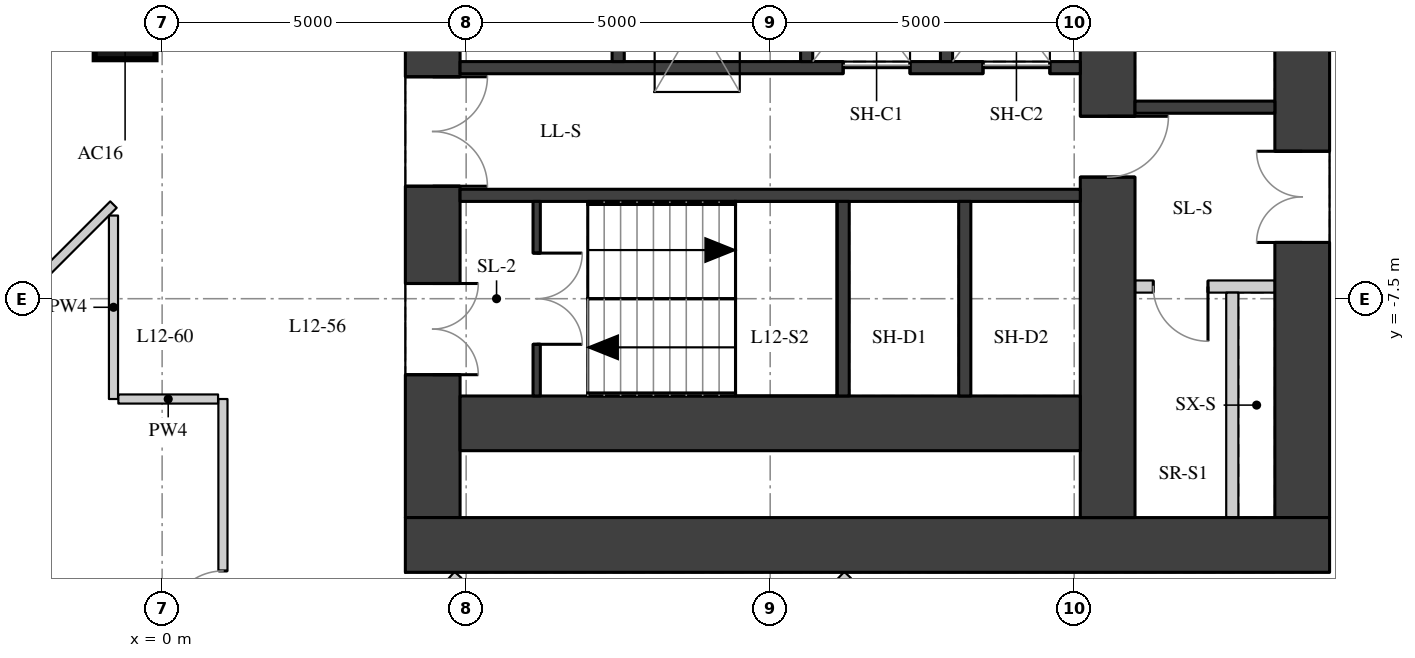
"""IFC4 building model, lengths in metres.
Left out: names, types, materials, properties, quantities, classifications, styles, units other than length and angle.
Written with IfcOpenShell. Run it as: python <this file> out.ifc"""

import sys

from ifc_helpers import new_model, si_unit, direction, frame, frame_2d, origin, origin_2d, place, context, subcontext, project, spatial, rectangle, extrude, element, fill, save


model = new_model("IFC4")
c1 = context("Model", 3, precision=1e-05, world=origin(), true_north=direction((0.0, 1.0)))
c2 = subcontext(c1, "Body", "Model", "MODEL_VIEW")
j1 = project(units=[si_unit("LENGTHUNIT", "METRE"), si_unit("PLANEANGLEUNIT", "RADIAN")], contexts=[c1])
p1 = place(None, origin())
s1 = spatial("IfcSite", under=j1, at=p1, CompositionType="ELEMENT")
p2 = place(p1, origin())
s2 = spatial("IfcBuilding", under=s1, at=p2, CompositionType="ELEMENT")
p3 = place(p2, frame((0.0, 0.0, 48.1)))
s3 = spatial("IfcBuildingStorey", under=s2, at=p3, CompositionType="ELEMENT", Elevation=48.1)
p4 = place(p3, frame((-0.609, -3.062, 0.0), z_axis=(0.0, 0.0, 1.0), x_axis=(1.0, 0.0, 0.0)))
e1 = element("IfcColumn", 1, at=p4, inside=s3, PredefinedType="COLUMN", context=c2, shape_type="SweptSolid", body=[
    extrude(rectangle(XDim=1.0, YDim=1.0, at=origin_2d()), origin(), (0.0, 0.0, 1.0), 3.3),
])
p5 = place(p3, frame((4.45, -11.1, 0.0), z_axis=(0.0, 0.0, 1.0), x_axis=(0.0, 1.0, 0.0)))
e2 = element("IfcWall", 2, at=p5, inside=s3, PredefinedType="SHEAR", context=c2, shape_type="SweptSolid", body=[
    extrude(rectangle(XDim=22.2, YDim=0.9, at=frame_2d((11.1, 0.0))), origin(), (0.0, 0.0, 1.0), 3.02),
])
p6 = place(p5, frame((2.35, 0.0, 0.0)))
e3 = element("IfcOpeningElement", 3, at=p6, cuts=e2, PredefinedType="OPENING", context=c2, shape_type="SweptSolid", body=[
    extrude(rectangle(XDim=1.5, YDim=2.1, at=frame_2d((0.75, 1.05))), frame((0.0, 0.46, 0.0), z_axis=(0.0, -1.0, 0.0), x_axis=(1.0, 0.0, 0.0)), (0.0, 0.0, 1.0), 0.92),
])
p7 = place(p5, frame((5.45, 0.0, 0.0)))
e4 = element("IfcOpeningElement", 4, at=p7, cuts=e2, PredefinedType="OPENING", context=c2, shape_type="SweptSolid", body=[
    extrude(rectangle(XDim=1.8, YDim=2.1, at=frame_2d((0.9, 1.05))), frame((0.0, 0.46, 0.0), z_axis=(0.0, -1.0, 0.0), x_axis=(1.0, 0.0, 0.0)), (0.0, 0.0, 1.0), 0.92),
])
p8 = place(p5, frame((7.95, 0.0, 0.0)))
e5 = element("IfcOpeningElement", 5, at=p8, cuts=e2, PredefinedType="OPENING", context=c2, shape_type="SweptSolid", body=[
    extrude(rectangle(XDim=1.1, YDim=2.1, at=frame_2d((0.55, 1.05))), frame((0.0, 0.46, 0.0), z_axis=(0.0, -1.0, 0.0), x_axis=(1.0, 0.0, 0.0)), (0.0, 0.0, 1.0), 0.92),
])
p9 = place(p5, frame((10.6, 0.0, 0.0)))
e6 = element("IfcOpeningElement", 6, at=p9, cuts=e2, PredefinedType="OPENING", context=c2, shape_type="SweptSolid", body=[
    extrude(rectangle(XDim=1.0, YDim=2.1, at=frame_2d((0.5, 1.05))), frame((0.0, 0.46, 0.0), z_axis=(0.0, -1.0, 0.0), x_axis=(1.0, 0.0, 0.0)), (0.0, 0.0, 1.0), 0.92),
])
p10 = place(p5, frame((13.15, 0.0, 0.0)))
e7 = element("IfcOpeningElement", 7, at=p10, cuts=e2, PredefinedType="OPENING", context=c2, shape_type="SweptSolid", body=[
    extrude(rectangle(XDim=1.1, YDim=2.1, at=frame_2d((0.55, 1.05))), frame((0.0, 0.46, 0.0), z_axis=(0.0, -1.0, 0.0), x_axis=(1.0, 0.0, 0.0)), (0.0, 0.0, 1.0), 0.92),
])
p11 = place(p5, frame((14.95, 0.0, 0.0)))
e8 = element("IfcOpeningElement", 8, at=p11, cuts=e2, PredefinedType="OPENING", context=c2, shape_type="SweptSolid", body=[
    extrude(rectangle(XDim=1.8, YDim=2.1, at=frame_2d((0.9, 1.05))), frame((0.0, 0.46, 0.0), z_axis=(0.0, -1.0, 0.0), x_axis=(1.0, 0.0, 0.0)), (0.0, 0.0, 1.0), 0.92),
])
p12 = place(p5, frame((18.35, 0.0, 0.0)))
e9 = element("IfcOpeningElement", 9, at=p12, cuts=e2, PredefinedType="OPENING", context=c2, shape_type="SweptSolid", body=[
    extrude(rectangle(XDim=1.5, YDim=2.1, at=frame_2d((0.75, 1.05))), frame((0.0, 0.46, 0.0), z_axis=(0.0, -1.0, 0.0), x_axis=(1.0, 0.0, 0.0)), (0.0, 0.0, 1.0), 0.92),
])
p13 = place(p3, frame((18.75, -11.1, 0.0), z_axis=(0.0, 0.0, 1.0), x_axis=(0.0, 1.0, 0.0)))
e10 = element("IfcWall", 10, at=p13, inside=s3, PredefinedType="SHEAR", context=c2, shape_type="SweptSolid", body=[
    extrude(rectangle(XDim=22.2, YDim=0.9, at=frame_2d((11.1, 0.0))), origin(), (0.0, 0.0, 1.0), 3.02),
])
p14 = place(p13, frame((15.925, 0.0, 0.0)))
e11 = element("IfcOpeningElement", 11, at=p14, cuts=e10, PredefinedType="OPENING", context=c2, shape_type="SweptSolid", body=[
    extrude(rectangle(XDim=1.5, YDim=2.1, at=frame_2d((0.75, 1.05))), frame((0.0, 0.46, 0.0), z_axis=(0.0, -1.0, 0.0), x_axis=(1.0, 0.0, 0.0)), (0.0, 0.0, 1.0), 0.92),
])
p15 = place(p13, frame((4.525, 0.0, 0.0)))
e12 = element("IfcOpeningElement", 12, at=p15, cuts=e10, PredefinedType="OPENING", context=c2, shape_type="SweptSolid", body=[
    extrude(rectangle(XDim=1.5, YDim=2.1, at=frame_2d((0.75, 1.05))), frame((0.0, 0.46, 0.0), z_axis=(0.0, -1.0, 0.0), x_axis=(1.0, 0.0, 0.0)), (0.0, 0.0, 1.0), 0.92),
])
p16 = place(p3, frame((4.0, -11.55, 0.0), z_axis=(0.0, 0.0, 1.0), x_axis=(1.0, 0.0, 0.0)))
e13 = element("IfcWall", 13, at=p16, inside=s3, PredefinedType="SHEAR", context=c2, shape_type="SweptSolid", body=[
    extrude(rectangle(XDim=15.2, YDim=0.9, at=frame_2d((7.6, 0.0))), origin(), (0.0, 0.0, 1.0), 3.02),
])
p17 = place(p3, frame((15.55, -11.1, 0.0), z_axis=(0.0, 0.0, 1.0), x_axis=(0.0, 1.0, 0.0)))
e14 = element("IfcWall", 14, at=p17, inside=s3, PredefinedType="SHEAR", context=c2, shape_type="SweptSolid", body=[
    extrude(rectangle(XDim=22.2, YDim=0.9, at=frame_2d((11.1, 0.0))), origin(), (0.0, 0.0, 1.0), 3.02),
])
p18 = place(p17, frame((15.6, 0.0, 0.0)))
e15 = element("IfcOpeningElement", 15, at=p18, cuts=e14, PredefinedType="OPENING", context=c2, shape_type="SweptSolid", body=[
    extrude(rectangle(XDim=1.0, YDim=2.1, at=frame_2d((0.5, 1.05))), frame((0.0, 0.46, 0.0), z_axis=(0.0, -1.0, 0.0), x_axis=(1.0, 0.0, 0.0)), (0.0, 0.0, 1.0), 0.92),
])
p19 = place(p17, frame((5.6, 0.0, 0.0)))
e16 = element("IfcOpeningElement", 16, at=p19, cuts=e14, PredefinedType="OPENING", context=c2, shape_type="SweptSolid", body=[
    extrude(rectangle(XDim=1.0, YDim=2.1, at=frame_2d((0.5, 1.05))), frame((0.0, 0.46, 0.0), z_axis=(0.0, -1.0, 0.0), x_axis=(1.0, 0.0, 0.0)), (0.0, 0.0, 1.0), 0.92),
])
p20 = place(p3, frame((4.9, -9.55, 0.0), z_axis=(0.0, 0.0, 1.0), x_axis=(1.0, 0.0, 0.0)))
e17 = element("IfcWall", 17, at=p20, inside=s3, PredefinedType="SHEAR", context=c2, shape_type="SweptSolid", body=[
    extrude(rectangle(XDim=10.2, YDim=0.9, at=frame_2d((5.1, 0.0))), origin(), (0.0, 0.0, 1.0), 3.02),
])
p21 = place(p3, frame((4.9, -3.7, 0.0), z_axis=(0.0, 0.0, 1.0), x_axis=(1.0, 0.0, 0.0)))
e18 = element("IfcWall", 18, at=p21, inside=s3, PredefinedType="SHEAR", context=c2, shape_type="SweptSolid", body=[
    extrude(rectangle(XDim=10.2, YDim=0.2, at=frame_2d((5.1, 0.0))), origin(), (0.0, 0.0, 1.0), 3.02),
])
p22 = place(p21, frame((6.3, 0.0, 0.0)))
e19 = element("IfcOpeningElement", 19, at=p22, cuts=e18, PredefinedType="OPENING", context=c2, shape_type="SweptSolid", body=[
    extrude(rectangle(XDim=1.1, YDim=2.1, at=frame_2d((0.55, 1.05))), frame((0.0, 0.11, 0.0), z_axis=(0.0, -1.0, 0.0), x_axis=(1.0, 0.0, 0.0)), (0.0, 0.0, 1.0), 0.22),
])
p23 = place(p21, frame((8.6, 0.0, 0.0)))
e20 = element("IfcOpeningElement", 20, at=p23, cuts=e18, PredefinedType="OPENING", context=c2, shape_type="SweptSolid", body=[
    extrude(rectangle(XDim=1.1, YDim=2.1, at=frame_2d((0.55, 1.05))), frame((0.0, 0.11, 0.0), z_axis=(0.0, -1.0, 0.0), x_axis=(1.0, 0.0, 0.0)), (0.0, 0.0, 1.0), 0.22),
])
p24 = place(p3, frame((4.9, -5.8, 0.0), z_axis=(0.0, 0.0, 1.0), x_axis=(1.0, 0.0, 0.0)))
e21 = element("IfcWall", 21, at=p24, inside=s3, PredefinedType="SHEAR", context=c2, shape_type="SweptSolid", body=[
    extrude(rectangle(XDim=10.2, YDim=0.2, at=frame_2d((5.1, 0.0))), origin(), (0.0, 0.0, 1.0), 3.02),
])
for number, where, z_axis, x_axis in (
    (22, (11.2, -9.1, 0.0), (0.0, 0.0, 1.0), (0.0, 1.0, 0.0)),
    (23, (13.2, -9.1, 0.0), (0.0, 0.0, 1.0), (0.0, 1.0, 0.0)),
):
    element("IfcWall", number, at=place(p3, frame(where, z_axis=z_axis, x_axis=x_axis)), inside=s3, PredefinedType="SHEAR", context=c2, shape_type="SweptSolid", body=[
        extrude(rectangle(XDim=3.2, YDim=0.2, at=frame_2d((1.6, 0.0))), origin(), (0.0, 0.0, 1.0), 3.02),
    ])
p25 = place(p3, frame((7.5, -3.6, 0.0), z_axis=(0.0, 0.0, 1.0), x_axis=(0.0, 1.0, 0.0)))
e24 = element("IfcWall", 24, at=p25, inside=s3, PredefinedType="SHEAR", context=c2, shape_type="SweptSolid", body=[
    extrude(rectangle(XDim=2.5, YDim=0.2, at=frame_2d((1.25, 0.0))), origin(), (0.0, 0.0, 1.0), 3.02),
])
p26 = place(p25, frame((0.7, 0.0, 0.0)))
e25 = element("IfcOpeningElement", 25, at=p26, cuts=e24, PredefinedType="OPENING", context=c2, shape_type="SweptSolid", body=[
    extrude(rectangle(XDim=1.1, YDim=2.1, at=frame_2d((0.55, 1.05))), frame((0.0, 0.11, 0.0), z_axis=(0.0, -1.0, 0.0), x_axis=(1.0, 0.0, 0.0)), (0.0, 0.0, 1.0), 0.22),
])
for number, where, z_axis, x_axis in (
    (26, (10.6, -3.6, 0.0), (0.0, 0.0, 1.0), (0.0, 1.0, 0.0)),
    (27, (12.9, -3.6, 0.0), (0.0, 0.0, 1.0), (0.0, 1.0, 0.0)),
):
    element("IfcWall", number, at=place(p3, frame(where, z_axis=z_axis, x_axis=x_axis)), inside=s3, PredefinedType="SHEAR", context=c2, shape_type="SweptSolid", body=[
        extrude(rectangle(XDim=2.5, YDim=0.2, at=frame_2d((1.25, 0.0))), origin(), (0.0, 0.0, 1.0), 3.02),
    ])
p27 = place(p3, frame((6.16, -9.1, 0.0), z_axis=(0.0, 0.0, 1.0), x_axis=(0.0, 1.0, 0.0)))
e28 = element("IfcWall", 28, at=p27, inside=s3, PredefinedType="SHEAR", context=c2, shape_type="SweptSolid", body=[
    extrude(rectangle(XDim=3.2, YDim=0.12, at=frame_2d((1.6, 0.0))), origin(), (0.0, 0.0, 1.0), 3.02),
])
p28 = place(p27, frame((0.85, 0.0, 0.0)))
e29 = element("IfcOpeningElement", 29, at=p28, cuts=e28, PredefinedType="OPENING", context=c2, shape_type="SweptSolid", body=[
    extrude(rectangle(XDim=1.5, YDim=2.1, at=frame_2d((0.75, 1.05))), frame((0.0, 0.07, 0.0), z_axis=(0.0, -1.0, 0.0), x_axis=(1.0, 0.0, 0.0)), (0.0, 0.0, 1.0), 0.14),
])
p29 = place(p3, frame((16.0, -4.35, 0.0), z_axis=(0.0, 0.0, 1.0), x_axis=(1.0, 0.0, 0.0)))
e30 = element("IfcWall", 30, at=p29, inside=s3, PredefinedType="SHEAR", context=c2, shape_type="SweptSolid", body=[
    extrude(rectangle(XDim=2.3, YDim=0.2, at=frame_2d((1.15, 0.0))), origin(), (0.0, 0.0, 1.0), 3.02),
])
p30 = place(p3, frame((16.0, -7.3, 0.0), z_axis=(0.0, 0.0, 1.0), x_axis=(1.0, 0.0, 0.0)))
e31 = element("IfcWall", 31, at=p30, inside=s3, PredefinedType="PARTITIONING", context=c2, shape_type="SweptSolid", body=[
    extrude(rectangle(XDim=2.3, YDim=0.2, at=frame_2d((1.15, 0.0))), origin(), (0.0, 0.0, 1.0), 3.02),
])
p31 = place(p30, frame((0.3, 0.0, 0.0)))
e32 = element("IfcOpeningElement", 32, at=p31, cuts=e31, PredefinedType="OPENING", context=c2, shape_type="SweptSolid", body=[
    extrude(rectangle(XDim=0.9, YDim=2.1, at=frame_2d((0.45, 1.05))), frame((0.0, 0.11, 0.0), z_axis=(0.0, -1.0, 0.0), x_axis=(1.0, 0.0, 0.0)), (0.0, 0.0, 1.0), 0.22),
])
p32 = place(p3, frame((17.6, -11.1, 0.0), z_axis=(0.0, 0.0, 1.0), x_axis=(0.0, 1.0, 0.0)))
e33 = element("IfcWall", 33, at=p32, inside=s3, PredefinedType="PARTITIONING", context=c2, shape_type="SweptSolid", body=[
    extrude(rectangle(XDim=3.7, YDim=0.2, at=frame_2d((1.85, 0.0))), origin(), (0.0, 0.0, 1.0), 3.02),
])
p33 = place(p3, frame((1.0, -9.15, 0.0), z_axis=(0.0, 0.0, 1.0), x_axis=(0.0, -1.0, 0.0)))
e34 = element("IfcWall", 34, at=p33, inside=s3, PredefinedType="PARTITIONING", context=c2, shape_type="SweptSolid", body=[
    extrude(rectangle(XDim=6.556, YDim=0.15, at=frame_2d((3.278, 0.0))), origin(), (0.0, 0.0, 1.0), 2.47),
])
p34 = place(p33, frame((2.828, 0.0, 0.0)))
e35 = element("IfcOpeningElement", 35, at=p34, cuts=e34, PredefinedType="OPENING", context=c2, shape_type="SweptSolid", body=[
    extrude(rectangle(XDim=0.9, YDim=2.1, at=frame_2d((0.45, 1.05))), frame((0.0, 0.085, 0.0), z_axis=(0.0, -1.0, 0.0), x_axis=(1.0, 0.0, 0.0)), (0.0, 0.0, 1.0), 0.17),
])
p35 = place(p3, frame((-3.158, -8.31, 0.0), z_axis=(0.0, 0.0, 1.0), x_axis=(0.707106781187, 0.707106781187, 0.0)))
e36 = element("IfcWall", 36, at=p35, inside=s3, PredefinedType="PARTITIONING", context=c2, shape_type="SweptSolid", body=[
    extrude(rectangle(XDim=3.334, YDim=0.15, at=frame_2d((1.667, 0.0))), origin(), (0.0, 0.0, 1.0), 3.02),
])
p36 = place(p3, frame((-0.8, -6.132, 0.0), z_axis=(0.0, 0.0, 1.0), x_axis=(0.0, -1.0, 0.0)))
e37 = element("IfcWall", 37, at=p36, inside=s3, PredefinedType="PARTITIONING", context=c2, shape_type="SweptSolid", body=[
    extrude(rectangle(XDim=3.018, YDim=0.15, at=frame_2d((1.509, 0.0))), origin(), (0.0, 0.0, 1.0), 3.02),
])
p37 = place(p3, frame((-0.72, -9.15, 0.0), z_axis=(0.0, 0.0, 1.0), x_axis=(1.0, 0.0, 0.0)))
e38 = element("IfcWall", 38, at=p37, inside=s3, PredefinedType="PARTITIONING", context=c2, shape_type="SweptSolid", body=[
    extrude(rectangle(XDim=1.64, YDim=0.15, at=frame_2d((0.82, 0.0))), origin(), (0.0, 0.0, 1.0), 3.02),
])
p38 = place(p3, frame((11.273, -12.043, 0.0), z_axis=(0.0, 0.0, 1.0), x_axis=(-0.687435283659, -0.7262456408, 0.0)))
e39 = element("IfcWall", 39, at=p38, inside=s3, PredefinedType="PARTITIONING", context=c2, shape_type="SweptSolid", body=[
    extrude(rectangle(XDim=2.233, YDim=0.15, at=frame_2d((1.117, 0.0))), origin(), (0.0, 0.0, 1.0), 3.02),
])
p39 = place(p3, frame((4.353, -12.623, 0.0), z_axis=(0.0, 0.0, 1.0), x_axis=(0.660265480509, 0.751032286422, 0.0)))
e40 = element("IfcWall", 40, at=p39, inside=s3, PredefinedType="PARTITIONING", context=c2, shape_type="SweptSolid", body=[
    extrude(rectangle(XDim=0.775, YDim=0.15, at=frame_2d((0.387, 0.0))), origin(), (0.0, 0.0, 1.0), 2.57),
])
p40 = place(p6, origin())
e41 = element("IfcDoor", 41, at=p40, inside=s3, OperationType="DOUBLE_DOOR_SINGLE_SWING", PredefinedType="DOOR", context=c2, shape_type="SweptSolid", body=[
    extrude(rectangle(XDim=1.5, YDim=2.1, at=frame_2d((0.75, 1.05))), frame((0.0, 0.025, 0.0), z_axis=(0.0, -1.0, 0.0), x_axis=(1.0, 0.0, 0.0)), (0.0, 0.0, 1.0), 0.05),
])
fill(e3, e41)
p41 = place(p7, origin())
e42 = element("IfcDoor", 42, at=p41, inside=s3, OperationType="DOUBLE_DOOR_SINGLE_SWING", PredefinedType="DOOR", context=c2, shape_type="SweptSolid", body=[
    extrude(rectangle(XDim=1.8, YDim=2.1, at=frame_2d((0.9, 1.05))), frame((0.0, 0.025, 0.0), z_axis=(0.0, -1.0, 0.0), x_axis=(1.0, 0.0, 0.0)), (0.0, 0.0, 1.0), 0.05),
])
fill(e4, e42)
p42 = place(p15, origin())
e43 = element("IfcDoor", 43, at=p42, inside=s3, OperationType="DOUBLE_DOOR_SINGLE_SWING", PredefinedType="DOOR", context=c2, shape_type="SweptSolid", body=[
    extrude(rectangle(XDim=1.5, YDim=2.1, at=frame_2d((0.75, 1.05))), frame((0.0, 0.025, 0.0), z_axis=(0.0, -1.0, 0.0), x_axis=(1.0, 0.0, 0.0)), (0.0, 0.0, 1.0), 0.05),
])
fill(e12, e43)
p43 = place(p28, origin())
e44 = element("IfcDoor", 44, at=p43, inside=s3, OperationType="DOUBLE_DOOR_SINGLE_SWING", PredefinedType="DOOR", context=c2, shape_type="SweptSolid", body=[
    extrude(rectangle(XDim=1.5, YDim=2.1, at=frame_2d((0.75, 1.05))), frame((0.0, 0.025, 0.0), z_axis=(0.0, -1.0, 0.0), x_axis=(1.0, 0.0, 0.0)), (0.0, 0.0, 1.0), 0.05),
])
fill(e29, e44)
p44 = place(p22, origin())
e45 = element("IfcDoor", 45, at=p44, inside=s3, OperationType="DOUBLE_DOOR_SLIDING", PredefinedType="DOOR", context=c2, shape_type="SweptSolid", body=[
    extrude(rectangle(XDim=1.1, YDim=2.1, at=frame_2d((0.55, 1.05))), frame((0.0, 0.025, 0.0), z_axis=(0.0, -1.0, 0.0), x_axis=(1.0, 0.0, 0.0)), (0.0, 0.0, 1.0), 0.05),
])
fill(e19, e45)
p45 = place(p23, origin())
e46 = element("IfcDoor", 46, at=p45, inside=s3, OperationType="DOUBLE_DOOR_SLIDING", PredefinedType="DOOR", context=c2, shape_type="SweptSolid", body=[
    extrude(rectangle(XDim=1.1, YDim=2.1, at=frame_2d((0.55, 1.05))), frame((0.0, 0.025, 0.0), z_axis=(0.0, -1.0, 0.0), x_axis=(1.0, 0.0, 0.0)), (0.0, 0.0, 1.0), 0.05),
])
fill(e20, e46)
p46 = place(p19, origin())
e47 = element("IfcDoor", 47, at=p46, inside=s3, OperationType="SINGLE_SWING_LEFT", PredefinedType="DOOR", context=c2, shape_type="SweptSolid", body=[
    extrude(rectangle(XDim=1.0, YDim=2.1, at=frame_2d((0.5, 1.05))), frame((0.0, 0.025, 0.0), z_axis=(0.0, -1.0, 0.0), x_axis=(1.0, 0.0, 0.0)), (0.0, 0.0, 1.0), 0.05),
])
fill(e16, e47)
p47 = place(p31, origin())
e48 = element("IfcDoor", 48, at=p47, inside=s3, OperationType="SINGLE_SWING_LEFT", PredefinedType="DOOR", context=c2, shape_type="SweptSolid", body=[
    extrude(rectangle(XDim=0.9, YDim=2.1, at=frame_2d((0.45, 1.05))), frame((0.0, 0.025, 0.0), z_axis=(0.0, -1.0, 0.0), x_axis=(1.0, 0.0, 0.0)), (0.0, 0.0, 1.0), 0.05),
])
fill(e32, e48)
p48 = place(p34, origin())
e49 = element("IfcDoor", 49, at=p48, inside=s3, OperationType="SINGLE_SWING_LEFT", PredefinedType="DOOR", context=c2, shape_type="SweptSolid", body=[
    extrude(rectangle(XDim=0.9, YDim=2.1, at=frame_2d((0.45, 1.05))), frame((0.0, 0.025, 0.0), z_axis=(0.0, -1.0, 0.0), x_axis=(1.0, 0.0, 0.0)), (0.0, 0.0, 1.0), 0.05),
])
fill(e35, e49)
save(model, sys.argv[1])
